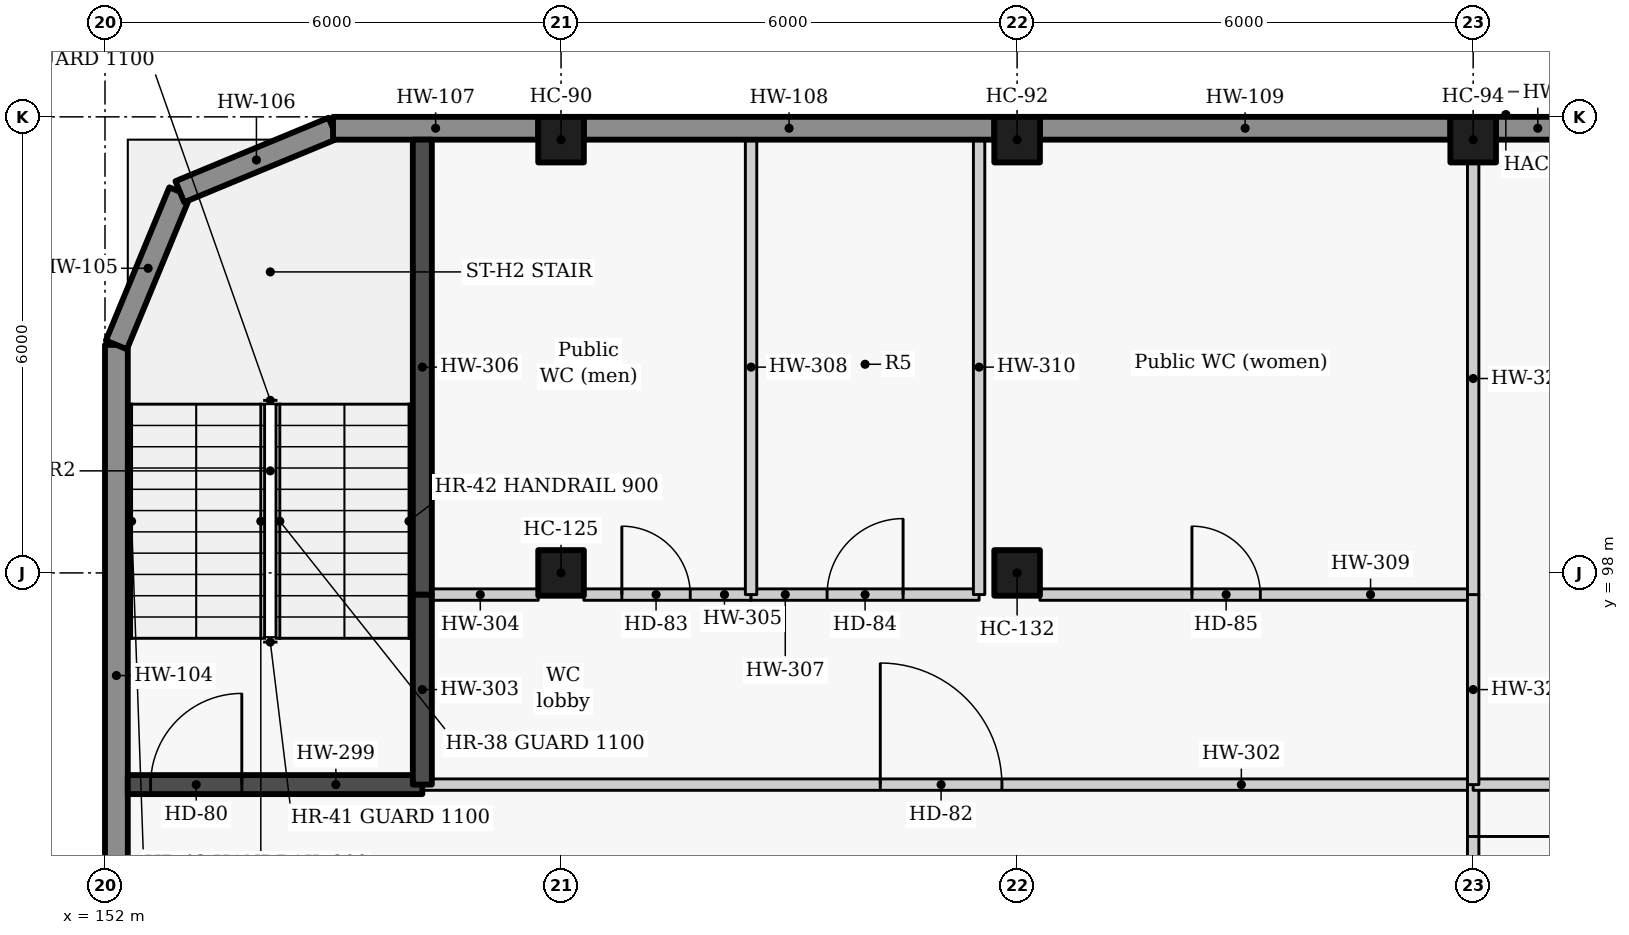
"""IFC4 building model, lengths in metres.
Left out: names, types, materials, properties, quantities, classifications, styles, units other than length and angle.
Written with IfcOpenShell. Run it as: python <this file> out.ifc"""

import sys

from ifc_helpers import new_model, si_unit, direction, frame, frame_2d, origin, origin_2d, place, context, subcontext, project, spatial, rectangle, extrude, element, fill, save


model = new_model("IFC4")
c1 = context("Model", 3, precision=1e-05, world=origin(), true_north=direction((0.0, 1.0)))
c2 = subcontext(c1, "Body", "Model", "MODEL_VIEW")
j1 = project(units=[si_unit("LENGTHUNIT", "METRE"), si_unit("PLANEANGLEUNIT", "RADIAN")], contexts=[c1])
p1 = place(None, origin())
s1 = spatial("IfcSite", under=j1, at=p1, CompositionType="ELEMENT")
p2 = place(p1, origin())
s2 = spatial("IfcBuilding", under=s1, at=p2, CompositionType="ELEMENT")
p3 = place(p2, frame((0.0, 0.0, 11.4)))
s3 = spatial("IfcBuildingStorey", under=s2, at=p3, CompositionType="ELEMENT", Elevation=11.4)
for number, where, z_axis, x_axis in (
    (1, (158.0, 103.7, 0.0), (0.0, 0.0, 1.0), (1.0, 0.0, 0.0)),
    (2, (164.0, 103.7, 0.0), (0.0, 0.0, 1.0), (1.0, 0.0, 0.0)),
    (3, (170.0, 103.7, 0.0), (0.0, 0.0, 1.0), (1.0, 0.0, 0.0)),
    (4, (158.0, 98.0, 0.0), (0.0, 0.0, 1.0), (1.0, 0.0, 0.0)),
    (5, (164.0, 98.0, 0.0), (0.0, 0.0, 1.0), (1.0, 0.0, 0.0)),
):
    element("IfcColumn", number, at=place(p3, frame(where, z_axis=z_axis, x_axis=x_axis)), inside=s3, PredefinedType="COLUMN", context=c2, shape_type="SweptSolid", body=[
        extrude(rectangle(XDim=0.6, YDim=0.6, at=origin_2d()), origin(), (0.0, 0.0, 1.0), 4.2),
    ])
p4 = place(p3, frame((152.15, 92.3, 0.0), z_axis=(0.0, 0.0, 1.0), x_axis=(0.0, 1.0, 0.0)))
e6 = element("IfcWall", 6, at=p4, inside=s3, PredefinedType="SOLIDWALL", context=c2, shape_type="SweptSolid", body=[
    extrude(rectangle(XDim=8.7, YDim=0.3, at=frame_2d((4.35, 0.0))), origin(), (0.0, 0.0, 1.0), 4.2),
])
for number, where, z_axis, x_axis in (
    (7, (152.15, 101.0, 0.0), (0.0, 0.0, 1.0), (0.383, 0.924, 0.0)),
    (8, (152.985, 103.015, 0.0), (0.0, 0.0, 1.0), (0.924, 0.383, 0.0)),
):
    element("IfcWall", number, at=place(p3, frame(where, z_axis=z_axis, x_axis=x_axis)), inside=s3, PredefinedType="SOLIDWALL", context=c2, shape_type="SweptSolid", body=[
        extrude(rectangle(XDim=2.181, YDim=0.3, at=frame_2d((1.091, 0.0))), origin(), (0.0, 0.0, 1.0), 4.2),
    ])
p5 = place(p3, frame((155.0, 103.85, 0.0), z_axis=(0.0, 0.0, 1.0), x_axis=(1.0, 0.0, 0.0)))
e9 = element("IfcWall", 9, at=p5, inside=s3, PredefinedType="SOLIDWALL", context=c2, shape_type="SweptSolid", body=[
    extrude(rectangle(XDim=2.7, YDim=0.3, at=frame_2d((1.35, 0.0))), origin(), (0.0, 0.0, 1.0), 4.2),
])
for number, where, z_axis, x_axis in (
    (10, (158.3, 103.85, 0.0), (0.0, 0.0, 1.0), (1.0, 0.0, 0.0)),
    (11, (164.3, 103.85, 0.0), (0.0, 0.0, 1.0), (1.0, 0.0, 0.0)),
):
    element("IfcWall", number, at=place(p3, frame(where, z_axis=z_axis, x_axis=x_axis)), inside=s3, PredefinedType="SOLIDWALL", context=c2, shape_type="SweptSolid", body=[
        extrude(rectangle(XDim=5.4, YDim=0.3, at=frame_2d((2.7, 0.0))), origin(), (0.0, 0.0, 1.0), 4.2),
    ])
p6 = place(p3, frame((170.3, 103.85, 0.0), z_axis=(0.0, 0.0, 1.0), x_axis=(1.0, 0.0, 0.0)))
e12 = element("IfcWall", 12, at=p6, inside=s3, PredefinedType="SOLIDWALL", context=c2, shape_type="SweptSolid", body=[
    extrude(rectangle(XDim=5.4, YDim=0.3, at=frame_2d((2.7, 0.0))), origin(), (0.0, 0.0, 1.0), 4.2),
])
p7 = place(p6, frame((1.2, 0.0, 0.9)))
e13 = element("IfcOpeningElement", 13, at=p7, cuts=e12, PredefinedType="OPENING", context=c2, shape_type="SweptSolid", body=[
    extrude(rectangle(XDim=3.0, YDim=1.8, at=frame_2d((1.5, 0.9))), frame((0.0, 0.16, 0.0), z_axis=(0.0, -1.0, 0.0), x_axis=(1.0, 0.0, 0.0)), (0.0, 0.0, 1.0), 0.32),
])
p8 = place(p3, frame((152.3, 95.215, 0.0), z_axis=(0.0, 0.0, 1.0), x_axis=(1.0, 0.0, 0.0)))
e14 = element("IfcWall", 14, at=p8, inside=s3, PredefinedType="SOLIDWALL", context=c2, shape_type="SweptSolid", body=[
    extrude(rectangle(XDim=3.875, YDim=0.25, at=frame_2d((1.938, 0.0))), origin(), (0.0, 0.0, 1.0), 4.2),
])
p9 = place(p8, frame((0.3, 0.0, 0.0)))
e15 = element("IfcOpeningElement", 15, at=p9, cuts=e14, PredefinedType="OPENING", context=c2, shape_type="SweptSolid", body=[
    extrude(rectangle(XDim=1.2, YDim=2.1, at=frame_2d((0.6, 1.05))), frame((0.0, 0.135, 0.0), z_axis=(0.0, -1.0, 0.0), x_axis=(1.0, 0.0, 0.0)), (0.0, 0.0, 1.0), 0.27),
])
p10 = place(p3, frame((156.175, 95.215, 0.0), z_axis=(0.0, 0.0, 1.0), x_axis=(1.0, 0.0, 0.0)))
e16 = element("IfcWall", 16, at=p10, inside=s3, PredefinedType="PARTITIONING", context=c2, shape_type="SweptSolid", body=[
    extrude(rectangle(XDim=13.825, YDim=0.15, at=frame_2d((6.913, 0.0))), origin(), (0.0, 0.0, 1.0), 3.85),
])
p11 = place(p10, frame((6.025, 0.0, 0.0)))
e17 = element("IfcOpeningElement", 17, at=p11, cuts=e16, PredefinedType="OPENING", context=c2, shape_type="SweptSolid", body=[
    extrude(rectangle(XDim=1.6, YDim=2.1, at=frame_2d((0.8, 1.05))), frame((0.0, 0.085, 0.0), z_axis=(0.0, -1.0, 0.0), x_axis=(1.0, 0.0, 0.0)), (0.0, 0.0, 1.0), 0.17),
])
p12 = place(p3, frame((156.175, 97.715, 0.0), z_axis=(0.0, 0.0, 1.0), x_axis=(0.0, -1.0, 0.0)))
e18 = element("IfcWall", 18, at=p12, inside=s3, PredefinedType="SOLIDWALL", context=c2, shape_type="SweptSolid", body=[
    extrude(rectangle(XDim=2.5, YDim=0.25, at=frame_2d((1.25, 0.0))), origin(), (0.0, 0.0, 1.0), 4.2),
])
p13 = place(p3, frame((156.175, 97.715, 0.0), z_axis=(0.0, 0.0, 1.0), x_axis=(1.0, 0.0, 0.0)))
e19 = element("IfcWall", 19, at=p13, inside=s3, PredefinedType="PLUMBINGWALL", context=c2, shape_type="SweptSolid", body=[
    extrude(rectangle(XDim=1.525, YDim=0.15, at=frame_2d((0.762, 0.0))), origin(), (0.0, 0.0, 1.0), 3.85),
])
p14 = place(p3, frame((158.3, 97.715, 0.0), z_axis=(0.0, 0.0, 1.0), x_axis=(1.0, 0.0, 0.0)))
e20 = element("IfcWall", 20, at=p14, inside=s3, PredefinedType="PLUMBINGWALL", context=c2, shape_type="SweptSolid", body=[
    extrude(rectangle(XDim=2.2, YDim=0.15, at=frame_2d((1.1, 0.0))), origin(), (0.0, 0.0, 1.0), 3.85),
])
p15 = place(p14, frame((0.5, 0.0, 0.0)))
e21 = element("IfcOpeningElement", 21, at=p15, cuts=e20, PredefinedType="OPENING", context=c2, shape_type="SweptSolid", body=[
    extrude(rectangle(XDim=0.9, YDim=2.1, at=frame_2d((0.45, 1.05))), frame((0.0, 0.085, 0.0), z_axis=(0.0, -1.0, 0.0), x_axis=(1.0, 0.0, 0.0)), (0.0, 0.0, 1.0), 0.17),
])
p16 = place(p3, frame((156.175, 103.7, 0.0), z_axis=(0.0, 0.0, 1.0), x_axis=(0.0, -1.0, 0.0)))
e22 = element("IfcWall", 22, at=p16, inside=s3, PredefinedType="SOLIDWALL", context=c2, shape_type="SweptSolid", body=[
    extrude(rectangle(XDim=5.985, YDim=0.25, at=frame_2d((2.992, 0.0))), origin(), (0.0, 0.0, 1.0), 4.2),
])
p17 = place(p3, frame((160.5, 97.715, 0.0), z_axis=(0.0, 0.0, 1.0), x_axis=(1.0, 0.0, 0.0)))
e23 = element("IfcWall", 23, at=p17, inside=s3, PredefinedType="PLUMBINGWALL", context=c2, shape_type="SweptSolid", body=[
    extrude(rectangle(XDim=3.0, YDim=0.15, at=frame_2d((1.5, 0.0))), origin(), (0.0, 0.0, 1.0), 3.85),
])
p18 = place(p17, frame((1.0, 0.0, 0.0)))
e24 = element("IfcOpeningElement", 24, at=p18, cuts=e23, PredefinedType="OPENING", context=c2, shape_type="SweptSolid", body=[
    extrude(rectangle(XDim=1.0, YDim=2.1, at=frame_2d((0.5, 1.05))), frame((0.0, 0.085, 0.0), z_axis=(0.0, -1.0, 0.0), x_axis=(1.0, 0.0, 0.0)), (0.0, 0.0, 1.0), 0.17),
])
p19 = place(p3, frame((160.5, 103.7, 0.0), z_axis=(0.0, 0.0, 1.0), x_axis=(0.0, -1.0, 0.0)))
e25 = element("IfcWall", 25, at=p19, inside=s3, PredefinedType="PLUMBINGWALL", context=c2, shape_type="SweptSolid", body=[
    extrude(rectangle(XDim=5.985, YDim=0.15, at=frame_2d((2.992, 0.0))), origin(), (0.0, 0.0, 1.0), 3.85),
])
p20 = place(p3, frame((164.3, 97.715, 0.0), z_axis=(0.0, 0.0, 1.0), x_axis=(1.0, 0.0, 0.0)))
e26 = element("IfcWall", 26, at=p20, inside=s3, PredefinedType="PLUMBINGWALL", context=c2, shape_type="SweptSolid", body=[
    extrude(rectangle(XDim=5.7, YDim=0.15, at=frame_2d((2.85, 0.0))), origin(), (0.0, 0.0, 1.0), 3.85),
])
p21 = place(p20, frame((2.0, 0.0, 0.0)))
e27 = element("IfcOpeningElement", 27, at=p21, cuts=e26, PredefinedType="OPENING", context=c2, shape_type="SweptSolid", body=[
    extrude(rectangle(XDim=0.9, YDim=2.1, at=frame_2d((0.45, 1.05))), frame((0.0, 0.085, 0.0), z_axis=(0.0, -1.0, 0.0), x_axis=(1.0, 0.0, 0.0)), (0.0, 0.0, 1.0), 0.17),
])
p22 = place(p3, frame((163.5, 103.7, 0.0), z_axis=(0.0, 0.0, 1.0), x_axis=(0.0, -1.0, 0.0)))
e28 = element("IfcWall", 28, at=p22, inside=s3, PredefinedType="PLUMBINGWALL", context=c2, shape_type="SweptSolid", body=[
    extrude(rectangle(XDim=5.985, YDim=0.15, at=frame_2d((2.992, 0.0))), origin(), (0.0, 0.0, 1.0), 3.85),
])
p23 = place(p3, frame((170.0, 95.215, 0.0), z_axis=(0.0, 0.0, 1.0), x_axis=(0.0, -1.0, 0.0)))
e29 = element("IfcWall", 29, at=p23, inside=s3, PredefinedType="PARTITIONING", context=c2, shape_type="SweptSolid", body=[
    extrude(rectangle(XDim=2.965, YDim=0.15, at=frame_2d((1.482, 0.0))), origin(), (0.0, 0.0, 1.0), 3.85),
])
p24 = place(p23, frame((0.683, 0.0, 0.0)))
e30 = element("IfcOpeningElement", 30, at=p24, cuts=e29, PredefinedType="OPENING", context=c2, shape_type="SweptSolid", body=[
    extrude(rectangle(XDim=1.6, YDim=2.1, at=frame_2d((0.8, 1.05))), frame((0.0, 0.085, 0.0), z_axis=(0.0, -1.0, 0.0), x_axis=(1.0, 0.0, 0.0)), (0.0, 0.0, 1.0), 0.17),
])
p25 = place(p3, frame((170.0, 95.215, 0.0), z_axis=(0.0, 0.0, 1.0), x_axis=(1.0, 0.0, 0.0)))
e31 = element("IfcWall", 31, at=p25, inside=s3, PredefinedType="PARTITIONING", context=c2, shape_type="SweptSolid", body=[
    extrude(rectangle(XDim=12.0, YDim=0.15, at=frame_2d((6.0, 0.0))), origin(), (0.0, 0.0, 1.0), 3.85),
])
p26 = place(p25, frame((5.5, 0.0, 0.0)))
e32 = element("IfcOpeningElement", 32, at=p26, cuts=e31, PredefinedType="OPENING", context=c2, shape_type="SweptSolid", body=[
    extrude(rectangle(XDim=1.0, YDim=2.1, at=frame_2d((0.5, 1.05))), frame((0.0, 0.085, 0.0), z_axis=(0.0, -1.0, 0.0), x_axis=(1.0, 0.0, 0.0)), (0.0, 0.0, 1.0), 0.17),
])
p27 = place(p3, frame((170.0, 97.715, 0.0), z_axis=(0.0, 0.0, 1.0), x_axis=(0.0, -1.0, 0.0)))
e33 = element("IfcWall", 33, at=p27, inside=s3, PredefinedType="PARTITIONING", context=c2, shape_type="SweptSolid", body=[
    extrude(rectangle(XDim=2.5, YDim=0.15, at=frame_2d((1.25, 0.0))), origin(), (0.0, 0.0, 1.0), 3.85),
])
p28 = place(p3, frame((170.0, 103.4, 0.0), z_axis=(0.0, 0.0, 1.0), x_axis=(0.0, -1.0, 0.0)))
e34 = element("IfcWall", 34, at=p28, inside=s3, PredefinedType="PLUMBINGWALL", context=c2, shape_type="SweptSolid", body=[
    extrude(rectangle(XDim=5.685, YDim=0.15, at=frame_2d((2.842, 0.0))), origin(), (0.0, 0.0, 1.0), 3.85),
])
p29 = place(p9, origin())
e35 = element("IfcDoor", 35, at=p29, inside=s3, OperationType="SINGLE_SWING_RIGHT", PredefinedType="DOOR", context=c2, shape_type="SweptSolid", body=[
    extrude(rectangle(XDim=1.2, YDim=2.1, at=frame_2d((0.6, 1.05))), frame((0.0, 0.025, 0.0), z_axis=(0.0, -1.0, 0.0), x_axis=(1.0, 0.0, 0.0)), (0.0, 0.0, 1.0), 0.05),
])
fill(e15, e35)
p30 = place(p11, origin())
e36 = element("IfcDoor", 36, at=p30, inside=s3, OperationType="DOUBLE_DOOR_SINGLE_SWING", PredefinedType="DOOR", context=c2, shape_type="SweptSolid", body=[
    extrude(rectangle(XDim=1.6, YDim=2.1, at=frame_2d((0.8, 1.05))), frame((0.0, 0.025, 0.0), z_axis=(0.0, -1.0, 0.0), x_axis=(1.0, 0.0, 0.0)), (0.0, 0.0, 1.0), 0.05),
])
fill(e17, e36)
p31 = place(p15, origin())
e37 = element("IfcDoor", 37, at=p31, inside=s3, OperationType="SINGLE_SWING_LEFT", PredefinedType="DOOR", context=c2, shape_type="SweptSolid", body=[
    extrude(rectangle(XDim=0.9, YDim=2.1, at=frame_2d((0.45, 1.05))), frame((0.0, 0.025, 0.0), z_axis=(0.0, -1.0, 0.0), x_axis=(1.0, 0.0, 0.0)), (0.0, 0.0, 1.0), 0.05),
])
fill(e21, e37)
p32 = place(p18, origin())
e38 = element("IfcDoor", 38, at=p32, inside=s3, OperationType="SINGLE_SWING_RIGHT", PredefinedType="DOOR", context=c2, shape_type="SweptSolid", body=[
    extrude(rectangle(XDim=1.0, YDim=2.1, at=frame_2d((0.5, 1.05))), frame((0.0, 0.025, 0.0), z_axis=(0.0, -1.0, 0.0), x_axis=(1.0, 0.0, 0.0)), (0.0, 0.0, 1.0), 0.05),
])
fill(e24, e38)
p33 = place(p21, origin())
e39 = element("IfcDoor", 39, at=p33, inside=s3, OperationType="SINGLE_SWING_LEFT", PredefinedType="DOOR", context=c2, shape_type="SweptSolid", body=[
    extrude(rectangle(XDim=0.9, YDim=2.1, at=frame_2d((0.45, 1.05))), frame((0.0, 0.025, 0.0), z_axis=(0.0, -1.0, 0.0), x_axis=(1.0, 0.0, 0.0)), (0.0, 0.0, 1.0), 0.05),
])
fill(e27, e39)
p34 = place(p24, origin())
e40 = element("IfcDoor", 40, at=p34, inside=s3, OperationType="DOUBLE_DOOR_SINGLE_SWING", PredefinedType="DOOR", context=c2, shape_type="SweptSolid", body=[
    extrude(rectangle(XDim=1.6, YDim=2.1, at=frame_2d((0.8, 1.05))), frame((0.0, 0.025, 0.0), z_axis=(0.0, -1.0, 0.0), x_axis=(1.0, 0.0, 0.0)), (0.0, 0.0, 1.0), 0.05),
])
fill(e30, e40)
save(model, sys.argv[1])
